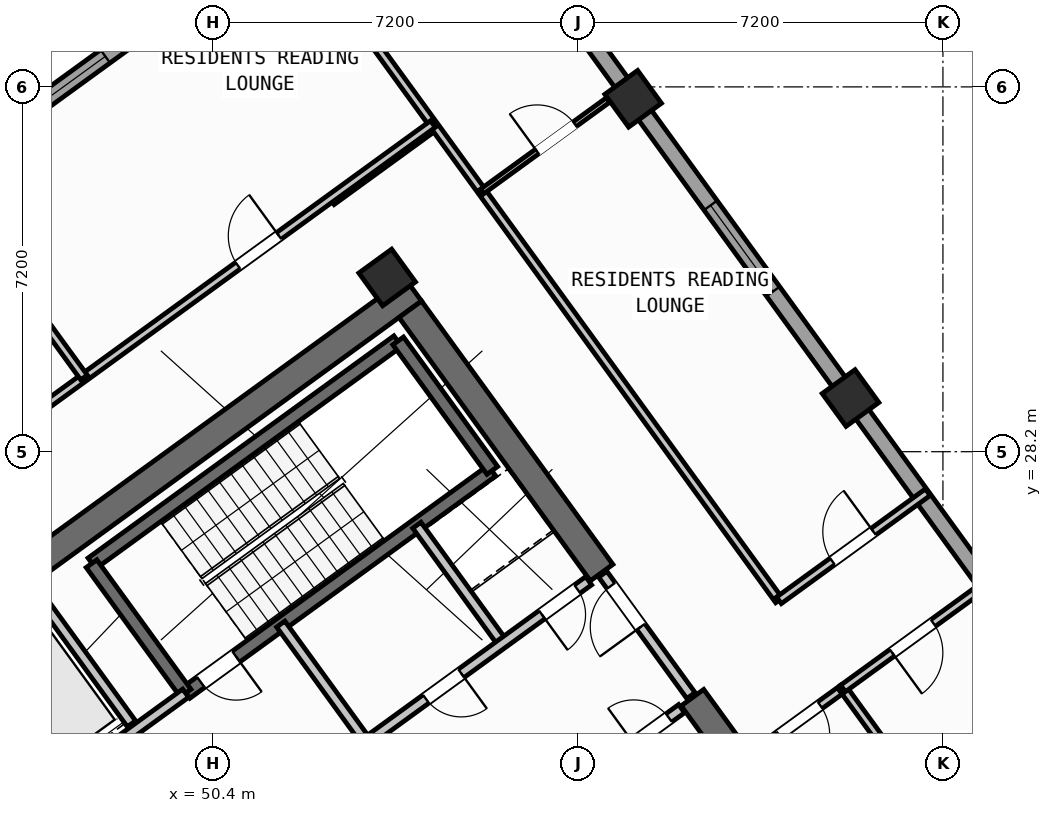
"""IFC4 building model, lengths in metres.
Left out: names, types, materials, properties, quantities, classifications, styles, units other than length and angle.
Written with IfcOpenShell. Run it as: python <this file> out.ifc"""

import sys

from ifc_helpers import new_model, si_unit, direction, frame, frame_2d, origin, origin_2d, place, context, subcontext, project, spatial, rectangle, hollow_rectangle, extrude, source, transform, mapped, element, fill, save


model = new_model("IFC4")
c1 = context("Model", 3, precision=1e-05, world=origin(), true_north=direction((0.0, 1.0)))
c2 = subcontext(c1, "Body", "Model", "MODEL_VIEW")
j1 = project(units=[si_unit("LENGTHUNIT", "METRE"), si_unit("PLANEANGLEUNIT", "RADIAN")], contexts=[c1])
p1 = place(None, origin())
s1 = spatial("IfcSite", under=j1, at=p1, CompositionType="ELEMENT")
p2 = place(p1, origin())
s2 = spatial("IfcBuilding", under=s1, at=p2, CompositionType="ELEMENT")
p3 = place(p2, frame((0.0, 0.0, 199.5)))
s3 = spatial("IfcBuildingStorey", under=s2, at=p3, CompositionType="ELEMENT", Elevation=199.5)
p4 = place(p3, frame((44.365, 24.142, 0.0), z_axis=(0.0, 0.0, 1.0), x_axis=(0.809024304885, 0.587775190107, 0.0)))
e1 = element("IfcWall", 1, at=p4, inside=s3, PredefinedType="SHEAR", context=c2, shape_type="SweptSolid", body=[
    extrude(rectangle(XDim=12.34, YDim=0.55, at=frame_2d((6.17, 0.0))), origin(), (0.0, 0.0, 1.0), 4.25),
])
p5 = place(p3, frame((48.526, 18.884, 0.0), z_axis=(0.0, 0.0, 1.0), x_axis=(-0.587764933797, 0.809031756236, 0.0)))
e2 = element("IfcWall", 2, at=p5, inside=s3, PredefinedType="SHEAR", context=c2, shape_type="SweptSolid", body=[
    extrude(rectangle(XDim=6.425, YDim=0.55, at=frame_2d((3.212, 0.0))), origin(), (0.0, 0.0, 1.0), 4.25),
])
p6 = place(p3, frame((61.958, 20.454, 0.0), z_axis=(0.0, 0.0, 1.0), x_axis=(-0.587802113096, 0.809004744015, 0.0)))
e3 = element("IfcWall", 3, at=p6, inside=s3, PredefinedType="SHEAR", context=c2, shape_type="SweptSolid", body=[
    extrude(rectangle(XDim=3.575, YDim=0.55, at=frame_2d((1.788, 0.0))), origin(), (0.0, 0.0, 1.0), 4.25),
])
p7 = place(p3, frame((58.064, 25.813, 0.0), z_axis=(0.0, 0.0, 1.0), x_axis=(-0.587764933797, 0.809031756236, 0.0)))
e4 = element("IfcWall", 4, at=p7, inside=s3, PredefinedType="SHEAR", context=c2, shape_type="SweptSolid", body=[
    extrude(rectangle(XDim=6.425, YDim=0.55, at=frame_2d((3.212, 0.0))), origin(), (0.0, 0.0, 1.0), 4.25),
])
m1 = source(origin(), c2, "Body", "SweptSolid", [
    extrude(hollow_rectangle(XDim=0.8, YDim=0.8, WallThickness=0.032, at=origin_2d()), origin(), (0.0, 0.0, 1.0), 4.5),
])
for number, where, z_axis, x_axis in (
    (5, (53.832, 31.638, 0.0), (0.0, 0.0, 1.0), (0.809, 0.588, 0.0)),
    (6, (62.977, 29.259, 0.0), (0.0, 0.0, 1.0), (0.809, 0.588, 0.0)),
    (7, (58.686, 35.165, 0.0), (0.0, 0.0, 1.0), (0.809, 0.588, 0.0)),
):
    element("IfcColumn", number, at=place(p3, frame(where, z_axis=z_axis, x_axis=x_axis)), inside=s3, PredefinedType="COLUMN", context=c2, shape_type="MappedRepresentation", body=[
        mapped(m1, transform((0.0, 0.0, 0.0), scale=1.0)),
    ])
p8 = place(p3, frame((42.207, 31.597, 0.0), z_axis=(0.0, 0.0, 1.0), x_axis=(0.809020333377, 0.587780656523, 0.0)))
e8 = element("IfcWall", 8, at=p8, inside=s3, PredefinedType="STANDARD", context=c2, shape_type="SweptSolid", body=[
    extrude(rectangle(XDim=15.223, YDim=0.32, at=frame_2d((7.611, 0.0))), origin(), (0.0, 0.0, 1.0), 4.25),
])
p9 = place(p8, frame((12.82, 0.0, 0.0)))
e9 = element("IfcOpeningElement", 9, at=p9, cuts=e8, PredefinedType="OPENING", context=c2, shape_type="SweptSolid", body=[
    extrude(rectangle(XDim=1.05, YDim=2.15, at=frame_2d((0.525, 1.075))), frame((0.0, 0.17, 0.0), z_axis=(0.0, -1.0, 0.0), x_axis=(1.0, 0.0, 0.0)), (0.0, 0.0, 1.0), 0.34),
])
p10 = place(p8, frame((1.018, 0.0, 0.85)))
e10 = element("IfcOpeningElement", 10, at=p10, cuts=e8, PredefinedType="OPENING", context=c2, shape_type="SweptSolid", body=[
    extrude(rectangle(XDim=1.5, YDim=1.5, at=frame_2d((0.75, 0.75))), frame((0.0, 0.17, 0.0), z_axis=(0.0, -1.0, 0.0), x_axis=(1.0, 0.0, 0.0)), (0.0, 0.0, 1.0), 0.34),
])
p11 = place(p8, frame((5.394, 0.0, 0.8)))
e11 = element("IfcOpeningElement", 11, at=p11, cuts=e8, PredefinedType="OPENING", context=c2, shape_type="SweptSolid", body=[
    extrude(rectangle(XDim=2.1, YDim=1.55, at=frame_2d((1.05, 0.775))), frame((0.0, 0.17, 0.0), z_axis=(0.0, -1.0, 0.0), x_axis=(1.0, 0.0, 0.0)), (0.0, 0.0, 1.0), 0.34),
])
p12 = place(p3, frame((54.81, 40.5, 0.0), z_axis=(0.0, 0.0, 1.0), x_axis=(0.587783625747, -0.809018176127, 0.0)))
e12 = element("IfcWall", 12, at=p12, inside=s3, PredefinedType="STANDARD", context=c2, shape_type="SweptSolid", body=[
    extrude(rectangle(XDim=21.587, YDim=0.32, at=frame_2d((10.794, 0.0))), origin(), (0.0, 0.0, 1.0), 3.725),
])
p13 = place(p12, frame((2.018, 0.0, 0.65)))
e13 = element("IfcOpeningElement", 13, at=p13, cuts=e12, PredefinedType="OPENING", context=c2, shape_type="SweptSolid", body=[
    extrude(rectangle(XDim=2.8, YDim=2.1, at=frame_2d((1.4, 1.05))), frame((0.0, 0.17, 0.0), z_axis=(0.0, -1.0, 0.0), x_axis=(1.0, 0.0, 0.0)), (0.0, 0.0, 1.0), 0.34),
])
p14 = place(p12, frame((9.194, 0.0, 0.8)))
e14 = element("IfcOpeningElement", 14, at=p14, cuts=e12, PredefinedType="OPENING", context=c2, shape_type="SweptSolid", body=[
    extrude(rectangle(XDim=2.1, YDim=1.55, at=frame_2d((1.05, 0.775))), frame((0.0, 0.17, 0.0), z_axis=(0.0, -1.0, 0.0), x_axis=(1.0, 0.0, 0.0)), (0.0, 0.0, 1.0), 0.34),
])
p15 = place(p3, frame((67.454, 22.747, 0.0), z_axis=(0.0, 0.0, 1.0), x_axis=(-0.809021120468, -0.587779573171, 0.0)))
e15 = element("IfcWall", 15, at=p15, inside=s3, PredefinedType="STANDARD", context=c2, shape_type="SweptSolid", body=[
    extrude(rectangle(XDim=17.588, YDim=0.32, at=frame_2d((8.794, 0.0))), origin(), (0.0, 0.0, 1.0), 4.25),
])
p16 = place(p15, frame((1.624, 0.0, 0.0)))
e16 = element("IfcOpeningElement", 16, at=p16, cuts=e15, PredefinedType="OPENING", context=c2, shape_type="SweptSolid", body=[
    extrude(rectangle(XDim=1.05, YDim=2.15, at=frame_2d((0.525, 1.075))), frame((0.0, 0.17, 0.0), z_axis=(0.0, -1.0, 0.0), x_axis=(1.0, 0.0, 0.0)), (0.0, 0.0, 1.0), 0.34),
])
p17 = place(p15, frame((7.769, 0.0, 0.65)))
e17 = element("IfcOpeningElement", 17, at=p17, cuts=e15, PredefinedType="OPENING", context=c2, shape_type="SweptSolid", body=[
    extrude(rectangle(XDim=2.8, YDim=2.1, at=frame_2d((1.4, 1.05))), frame((0.0, 0.17, 0.0), z_axis=(0.0, -1.0, 0.0), x_axis=(1.0, 0.0, 0.0)), (0.0, 0.0, 1.0), 0.34),
])
p18 = place(p15, frame((13.019, 0.0, 0.65)))
e18 = element("IfcOpeningElement", 18, at=p18, cuts=e15, PredefinedType="OPENING", context=c2, shape_type="SweptSolid", body=[
    extrude(rectangle(XDim=2.8, YDim=2.1, at=frame_2d((1.4, 1.05))), frame((0.0, 0.17, 0.0), z_axis=(0.0, -1.0, 0.0), x_axis=(1.0, 0.0, 0.0)), (0.0, 0.0, 1.0), 0.34),
])
p19 = place(p3, frame((48.006, 25.996, 0.0), z_axis=(0.0, 0.0, 1.0), x_axis=(0.80901903764, 0.587782439969, 0.0)))
e19 = element("IfcWall", 19, at=p19, inside=s3, PredefinedType="SHEAR", context=c2, shape_type="SweptSolid", body=[
    extrude(rectangle(XDim=7.46, YDim=0.26, at=frame_2d((3.73, 0.0))), origin(), (0.0, 0.0, 1.0), 4.25),
])
p20 = place(p3, frame((49.863, 23.44, 0.0), z_axis=(0.0, 0.0, 1.0), x_axis=(0.809003474932, 0.587803859759, 0.0)))
e20 = element("IfcWall", 20, at=p20, inside=s3, PredefinedType="SHEAR", context=c2, shape_type="SweptSolid", body=[
    extrude(rectangle(XDim=7.46, YDim=0.26, at=frame_2d((3.73, 0.0))), origin(), (0.0, 0.0, 1.0), 4.25),
])
p21 = place(p20, frame((0.36, 0.0, 0.0)))
e21 = element("IfcOpeningElement", 21, at=p21, cuts=e20, PredefinedType="OPENING", context=c2, shape_type="SweptSolid", body=[
    extrude(rectangle(XDim=0.86, YDim=2.05, at=frame_2d((0.43, 1.025))), frame((0.0, 0.14, 0.0), z_axis=(0.0, -1.0, 0.0), x_axis=(1.0, 0.0, 0.0)), (0.0, 0.0, 1.0), 0.28),
])
p22 = place(p3, frame((49.855, 23.434, 0.0), z_axis=(0.0, 0.0, 1.0), x_axis=(-0.58776738483, 0.809029975545, 0.0)))
e22 = element("IfcWall", 22, at=p22, inside=s3, PredefinedType="SHEAR", context=c2, shape_type="SweptSolid", body=[
    extrude(rectangle(XDim=3.16, YDim=0.26, at=frame_2d((1.58, 0.0))), origin(), (0.0, 0.0, 1.0), 4.25),
])
p23 = place(p3, frame((55.906, 27.831, 0.0), z_axis=(0.0, 0.0, 1.0), x_axis=(-0.587804123638, 0.809003283204, 0.0)))
e23 = element("IfcWall", 23, at=p23, inside=s3, PredefinedType="SHEAR", context=c2, shape_type="SweptSolid", body=[
    extrude(rectangle(XDim=3.16, YDim=0.26, at=frame_2d((1.58, 0.0))), origin(), (0.0, 0.0, 1.0), 4.25),
])
p24 = place(p3, frame((47.065, 21.407, 0.0), z_axis=(0.0, 0.0, 1.0), x_axis=(0.809032984992, 0.587763242466, 0.0)))
e24 = element("IfcWall", 24, at=p24, inside=s3, PredefinedType="STANDARD", context=c2, shape_type="SweptSolid", body=[
    extrude(rectangle(XDim=3.448, YDim=0.2, at=frame_2d((1.724, 0.0))), origin(), (0.0, 0.0, 1.0), 4.24),
])
p25 = place(p24, frame((0.458, 0.0, 0.0)))
e25 = element("IfcOpeningElement", 25, at=p25, cuts=e24, PredefinedType="OPENING", context=c2, shape_type="SweptSolid", body=[
    extrude(rectangle(XDim=1.3, YDim=2.2, at=frame_2d((0.65, 1.1))), frame((0.0, 0.11, 0.0), z_axis=(0.0, -1.0, 0.0), x_axis=(1.0, 0.0, 0.0)), (0.0, 0.0, 1.0), 0.22),
])
p26 = place(p3, frame((56.553, 20.884, 0.0), z_axis=(0.0, 0.0, 1.0), x_axis=(0.809023564264, 0.58777620951, 0.0)))
e26 = element("IfcWall", 26, at=p26, inside=s3, PredefinedType="STANDARD", context=c2, shape_type="SweptSolid", body=[
    extrude(rectangle(XDim=3.818, YDim=0.2, at=frame_2d((1.909, 0.0))), origin(), (0.0, 0.0, 1.0), 4.24),
])
p27 = place(p26, frame((0.57, 0.0, 0.0)))
e27 = element("IfcOpeningElement", 27, at=p27, cuts=e26, PredefinedType="OPENING", context=c2, shape_type="SweptSolid", body=[
    extrude(rectangle(XDim=1.1, YDim=2.15, at=frame_2d((0.55, 1.075))), frame((0.0, 0.11, 0.0), z_axis=(0.0, -1.0, 0.0), x_axis=(1.0, 0.0, 0.0)), (0.0, 0.0, 1.0), 0.22),
])
p28 = place(p26, frame((2.65, 0.0, 0.0)))
e28 = element("IfcOpeningElement", 28, at=p28, cuts=e26, PredefinedType="OPENING", context=c2, shape_type="SweptSolid", body=[
    extrude(rectangle(XDim=0.86, YDim=2.05, at=frame_2d((0.43, 1.025))), frame((0.0, 0.11, 0.0), z_axis=(0.0, -1.0, 0.0), x_axis=(1.0, 0.0, 0.0)), (0.0, 0.0, 1.0), 0.22),
])
p29 = place(p3, frame((48.786, 22.83, 0.0), z_axis=(0.0, 0.0, 1.0), x_axis=(-0.587783856777, 0.809018008275, 0.0)))
e29 = element("IfcWall", 29, at=p29, inside=s3, PredefinedType="STANDARD", context=c2, shape_type="SweptSolid", body=[
    extrude(rectangle(XDim=2.92, YDim=0.2, at=frame_2d((1.46, 0.0))), origin(), (0.0, 0.0, 1.0), 4.24),
])
p30 = place(p3, frame((53.425, 22.468, 0.0), z_axis=(0.0, 0.0, 1.0), x_axis=(-0.5877230039, 0.809062216821, 0.0)))
e30 = element("IfcWall", 30, at=p30, inside=s3, PredefinedType="STANDARD", context=c2, shape_type="SweptSolid", body=[
    extrude(rectangle(XDim=2.88, YDim=0.2, at=frame_2d((1.44, 0.0))), origin(), (0.0, 0.0, 1.0), 4.24),
])
p31 = place(p3, frame((56.111, 24.419, 0.0), z_axis=(0.0, 0.0, 1.0), x_axis=(-0.58777848983, 0.809021907548, 0.0)))
e31 = element("IfcWall", 31, at=p31, inside=s3, PredefinedType="STANDARD", context=c2, shape_type="SweptSolid", body=[
    extrude(rectangle(XDim=2.88, YDim=0.2, at=frame_2d((1.44, 0.0))), origin(), (0.0, 0.0, 1.0), 4.24),
])
p32 = place(p3, frame((53.425, 22.468, 0.0), z_axis=(0.0, 0.0, 1.0), x_axis=(0.809024377198, 0.587775090574, 0.0)))
e32 = element("IfcWall", 32, at=p32, inside=s3, PredefinedType="STANDARD", context=c2, shape_type="SweptSolid", body=[
    extrude(rectangle(XDim=5.418, YDim=0.2, at=frame_2d((2.709, 0.0))), origin(), (0.0, 0.0, 1.0), 4.24),
])
p33 = place(p32, frame((4.28, 0.0, 0.0)))
e33 = element("IfcOpeningElement", 33, at=p33, cuts=e32, PredefinedType="OPENING", context=c2, shape_type="SweptSolid", body=[
    extrude(rectangle(XDim=0.86, YDim=2.05, at=frame_2d((0.43, 1.025))), frame((0.0, 0.11, 0.0), z_axis=(0.0, -1.0, 0.0), x_axis=(1.0, 0.0, 0.0)), (0.0, 0.0, 1.0), 0.22),
])
p34 = place(p32, frame((1.45, 0.0, 0.0)))
e34 = element("IfcOpeningElement", 34, at=p34, cuts=e32, PredefinedType="OPENING", context=c2, shape_type="SweptSolid", body=[
    extrude(rectangle(XDim=0.86, YDim=2.05, at=frame_2d((0.43, 1.025))), frame((0.0, 0.11, 0.0), z_axis=(0.0, -1.0, 0.0), x_axis=(1.0, 0.0, 0.0)), (0.0, 0.0, 1.0), 0.22),
])
p35 = place(p3, frame((59.827, 23.386, 0.0), z_axis=(0.0, 0.0, 1.0), x_axis=(-0.587803840107, 0.809003489211, 0.0)))
e35 = element("IfcWall", 35, at=p35, inside=s3, PredefinedType="STANDARD", context=c2, shape_type="SweptSolid", body=[
    extrude(rectangle(XDim=2.96, YDim=0.2, at=frame_2d((1.48, 0.0))), origin(), (0.0, 0.0, 1.0), 4.24),
])
p36 = place(p35, frame((1.68, 0.0, 0.0)))
e36 = element("IfcOpeningElement", 36, at=p36, cuts=e35, PredefinedType="OPENING", context=c2, shape_type="SweptSolid", body=[
    extrude(rectangle(XDim=1.0, YDim=2.1, at=frame_2d((0.5, 1.05))), frame((0.0, 0.11, 0.0), z_axis=(0.0, -1.0, 0.0), x_axis=(1.0, 0.0, 0.0)), (0.0, 0.0, 1.0), 0.22),
])
p37 = place(p3, frame((61.042, 22.229, 0.0), z_axis=(0.0, 0.0, 1.0), x_axis=(0.809075443949, 0.587704794942, 0.0)))
e37 = element("IfcWall", 37, at=p37, inside=s3, PredefinedType="PARTITIONING", context=c2, shape_type="SweptSolid", body=[
    extrude(rectangle(XDim=2.208, YDim=0.16, at=frame_2d((1.104, 0.0))), origin(), (0.0, 0.0, 1.0), 4.24),
])
p38 = place(p37, frame((0.648, 0.0, 0.0)))
e38 = element("IfcOpeningElement", 38, at=p38, cuts=e37, PredefinedType="OPENING", context=c2, shape_type="SweptSolid", body=[
    extrude(rectangle(XDim=1.0, YDim=2.1, at=frame_2d((0.5, 1.05))), frame((0.0, 0.09, 0.0), z_axis=(0.0, -1.0, 0.0), x_axis=(1.0, 0.0, 0.0)), (0.0, 0.0, 1.0), 0.18),
])
p39 = place(p3, frame((52.739, 33.143, 0.0), z_axis=(0.0, 0.0, 1.0), x_axis=(0.809000999347, 0.58780726693, 0.0)))
e39 = element("IfcWall", 39, at=p39, inside=s3, PredefinedType="PARTITIONING", context=c2, shape_type="SweptSolid", body=[
    extrude(rectangle(XDim=2.51, YDim=0.16, at=frame_2d((1.255, 0.0))), origin(), (0.0, 0.0, 1.0), 4.24),
])
p40 = place(p3, frame((64.709, 20.938, 0.0), z_axis=(0.0, 0.0, 1.0), x_axis=(-0.587772420479, 0.809026317077, 0.0)))
e40 = element("IfcWall", 40, at=p40, inside=s3, PredefinedType="PARTITIONING", context=c2, shape_type="SweptSolid", body=[
    extrude(rectangle(XDim=3.2, YDim=0.16, at=frame_2d((1.6, 0.0))), origin(), (0.0, 0.0, 1.0), 4.24),
])
p41 = place(p3, frame((61.564, 25.266, 0.0), z_axis=(0.0, 0.0, 1.0), x_axis=(-0.587784527444, 0.809017521007, 0.0)))
e41 = element("IfcWall", 41, at=p41, inside=s3, PredefinedType="PARTITIONING", context=c2, shape_type="SweptSolid", body=[
    extrude(rectangle(XDim=16.35, YDim=0.16, at=frame_2d((8.175, 0.0))), origin(), (0.0, 0.0, 1.0), 4.24),
])
p42 = place(p3, frame((62.828, 23.527, 0.0), z_axis=(0.0, 0.0, 1.0), x_axis=(0.809003564202, 0.587803736896, 0.0)))
e42 = element("IfcWall", 42, at=p42, inside=s3, PredefinedType="PARTITIONING", context=c2, shape_type="SweptSolid", body=[
    extrude(rectangle(XDim=3.63, YDim=0.16, at=frame_2d((1.815, 0.0))), origin(), (0.0, 0.0, 1.0), 4.24),
])
p43 = place(p42, frame((1.2, 0.0, 0.0)))
e43 = element("IfcOpeningElement", 43, at=p43, cuts=e42, PredefinedType="OPENING", context=c2, shape_type="SweptSolid", body=[
    extrude(rectangle(XDim=1.0, YDim=2.1, at=frame_2d((0.5, 1.05))), frame((0.0, 0.09, 0.0), z_axis=(0.0, -1.0, 0.0), x_axis=(1.0, 0.0, 0.0)), (0.0, 0.0, 1.0), 0.18),
])
p44 = place(p3, frame((61.564, 25.266, 0.0), z_axis=(0.0, 0.0, 1.0), x_axis=(0.809012309495, 0.587791700422, 0.0)))
e44 = element("IfcWall", 44, at=p44, inside=s3, PredefinedType="PARTITIONING", context=c2, shape_type="SweptSolid", body=[
    extrude(rectangle(XDim=3.63, YDim=0.16, at=frame_2d((1.815, 0.0))), origin(), (0.0, 0.0, 1.0), 4.24),
])
p45 = place(p44, frame((1.305, 0.0, 0.0)))
e45 = element("IfcOpeningElement", 45, at=p45, cuts=e44, PredefinedType="OPENING", context=c2, shape_type="SweptSolid", body=[
    extrude(rectangle(XDim=1.0, YDim=2.1, at=frame_2d((0.5, 1.05))), frame((0.0, 0.09, 0.0), z_axis=(0.0, -1.0, 0.0), x_axis=(1.0, 0.0, 0.0)), (0.0, 0.0, 1.0), 0.18),
])
p46 = place(p3, frame((55.703, 33.334, 0.0), z_axis=(0.0, 0.0, 1.0), x_axis=(0.809044670406, 0.587747157618, 0.0)))
e46 = element("IfcWall", 46, at=p46, inside=s3, PredefinedType="PARTITIONING", context=c2, shape_type="SweptSolid", body=[
    extrude(rectangle(XDim=3.078, YDim=0.11, at=frame_2d((1.539, 0.0))), origin(), (0.0, 0.0, 1.0), 3.725),
])
p47 = place(p46, frame((1.345, 0.0, 0.0)))
e47 = element("IfcOpeningElement", 47, at=p47, cuts=e46, PredefinedType="OPENING", context=c2, shape_type="SweptSolid", body=[
    extrude(rectangle(XDim=0.92, YDim=2.08, at=frame_2d((0.46, 1.04))), frame((0.0, 0.065, 0.0), z_axis=(0.0, -1.0, 0.0), x_axis=(1.0, 0.0, 0.0)), (0.0, 0.0, 1.0), 0.13),
])
p48 = place(p3, frame((42.866, 26.044, 0.0), z_axis=(0.0, 0.0, 1.0), x_axis=(0.809020254154, 0.587780765566, 0.0)))
e48 = element("IfcWall", 48, at=p48, inside=s3, PredefinedType="PARTITIONING", context=c2, shape_type="SweptSolid", body=[
    extrude(rectangle(XDim=14.67, YDim=0.16, at=frame_2d((7.335, 0.0))), origin(), (0.0, 0.0, 1.0), 4.24),
])
p49 = place(p48, frame((3.215, 0.0, 0.0)))
e49 = element("IfcOpeningElement", 49, at=p49, cuts=e48, PredefinedType="OPENING", context=c2, shape_type="SweptSolid", body=[
    extrude(rectangle(XDim=1.0, YDim=2.1, at=frame_2d((0.5, 1.05))), frame((0.0, 0.09, 0.0), z_axis=(0.0, -1.0, 0.0), x_axis=(1.0, 0.0, 0.0)), (0.0, 0.0, 1.0), 0.18),
])
p50 = place(p48, frame((9.915, 0.0, 0.0)))
e50 = element("IfcOpeningElement", 50, at=p50, cuts=e48, PredefinedType="OPENING", context=c2, shape_type="SweptSolid", body=[
    extrude(rectangle(XDim=1.0, YDim=2.1, at=frame_2d((0.5, 1.05))), frame((0.0, 0.09, 0.0), z_axis=(0.0, -1.0, 0.0), x_axis=(1.0, 0.0, 0.0)), (0.0, 0.0, 1.0), 0.18),
])
p51 = place(p3, frame((47.849, 29.665, 0.0), z_axis=(0.0, 0.0, 1.0), x_axis=(-0.587785532001, 0.809016791155, 0.0)))
e51 = element("IfcWall", 51, at=p51, inside=s3, PredefinedType="PARTITIONING", context=c2, shape_type="SweptSolid", body=[
    extrude(rectangle(XDim=4.85, YDim=0.16, at=frame_2d((2.425, 0.0))), origin(), (0.0, 0.0, 1.0), 4.24),
])
m2 = source(origin(), c2, "Body", "SweptSolid", [
    extrude(rectangle(XDim=2.1, YDim=1.55, at=frame_2d((1.05, 0.775))), frame((0.0, 0.03, 0.0), z_axis=(0.0, -1.0, 0.0), x_axis=(1.0, 0.0, 0.0)), (0.0, 0.0, 1.0), 0.06),
])
p52 = place(p11, origin())
e52 = element("IfcWindow", 52, at=p52, inside=s3, PartitioningType="SINGLE_PANEL", PredefinedType="WINDOW", context=c2, shape_type="MappedRepresentation", body=[
    mapped(m2, transform((0.0, 0.0, 0.0), scale=1.0)),
])
fill(e11, e52)
p53 = place(p14, origin())
e53 = element("IfcWindow", 53, at=p53, inside=s3, PartitioningType="SINGLE_PANEL", PredefinedType="WINDOW", context=c2, shape_type="MappedRepresentation", body=[
    mapped(m2, transform((0.0, 0.0, 0.0), scale=1.0)),
])
fill(e14, e53)
m3 = source(origin(), c2, "Body", "SweptSolid", [
    extrude(rectangle(XDim=0.86, YDim=2.05, at=frame_2d((0.43, 1.025))), frame((0.0, 0.025, 0.0), z_axis=(0.0, -1.0, 0.0), x_axis=(1.0, 0.0, 0.0)), (0.0, 0.0, 1.0), 0.05),
])
p54 = place(p21, frame((0.86, 0.0, 0.0), z_axis=(0.0, 0.0, 1.0), x_axis=(-1.0, 0.0, 0.0)))
e54 = element("IfcDoor", 54, at=p54, inside=s3, OperationType="SINGLE_SWING_LEFT", PredefinedType="DOOR", context=c2, shape_type="MappedRepresentation", body=[
    mapped(m3, transform((0.0, 0.0, 0.0), scale=1.0)),
])
fill(e21, e54)
p55 = place(p28, origin())
e55 = element("IfcDoor", 55, at=p55, inside=s3, OperationType="SINGLE_SWING_LEFT", PredefinedType="DOOR", context=c2, shape_type="MappedRepresentation", body=[
    mapped(m3, transform((0.0, 0.0, 0.0), scale=1.0)),
])
fill(e28, e55)
p56 = place(p33, frame((0.86, 0.0, 0.0), z_axis=(0.0, 0.0, 1.0), x_axis=(-1.0, 0.0, 0.0)))
e56 = element("IfcDoor", 56, at=p56, inside=s3, OperationType="SINGLE_SWING_RIGHT", PredefinedType="DOOR", context=c2, shape_type="MappedRepresentation", body=[
    mapped(m3, transform((0.0, 0.0, 0.0), scale=1.0)),
])
fill(e33, e56)
p57 = place(p34, frame((0.86, 0.0, 0.0), z_axis=(0.0, 0.0, 1.0), x_axis=(-1.0, 0.0, 0.0)))
e57 = element("IfcDoor", 57, at=p57, inside=s3, OperationType="SINGLE_SWING_LEFT", PredefinedType="DOOR", context=c2, shape_type="MappedRepresentation", body=[
    mapped(m3, transform((0.0, 0.0, 0.0), scale=1.0)),
])
fill(e34, e57)
m4 = source(origin(), c2, "Body", "SweptSolid", [
    extrude(rectangle(XDim=1.0, YDim=2.1, at=frame_2d((0.5, 1.05))), frame((0.0, 0.025, 0.0), z_axis=(0.0, -1.0, 0.0), x_axis=(1.0, 0.0, 0.0)), (0.0, 0.0, 1.0), 0.05),
])
p58 = place(p38, frame((1.0, 0.0, 0.0), z_axis=(0.0, 0.0, 1.0), x_axis=(-1.0, 0.0, 0.0)))
e58 = element("IfcDoor", 58, at=p58, inside=s3, OperationType="SINGLE_SWING_RIGHT", PredefinedType="DOOR", context=c2, shape_type="MappedRepresentation", body=[
    mapped(m4, transform((0.0, 0.0, 0.0), scale=1.0)),
])
fill(e38, e58)
p59 = place(p36, origin())
e59 = element("IfcDoor", 59, at=p59, inside=s3, OperationType="SINGLE_SWING_LEFT", PredefinedType="DOOR", context=c2, shape_type="MappedRepresentation", body=[
    mapped(m4, transform((0.0, 0.0, 0.0), scale=1.0)),
])
fill(e36, e59)
p60 = place(p45, origin())
e60 = element("IfcDoor", 60, at=p60, inside=s3, OperationType="SINGLE_SWING_RIGHT", PredefinedType="DOOR", context=c2, shape_type="MappedRepresentation", body=[
    mapped(m4, transform((0.0, 0.0, 0.0), scale=1.0)),
])
fill(e45, e60)
m5 = source(origin(), c2, "Body", "SweptSolid", [
    extrude(rectangle(XDim=0.92, YDim=2.08, at=frame_2d((0.46, 1.04))), frame((0.0, 0.025, 0.0), z_axis=(0.0, -1.0, 0.0), x_axis=(1.0, 0.0, 0.0)), (0.0, 0.0, 1.0), 0.05),
])
p61 = place(p47, origin())
e61 = element("IfcDoor", 61, at=p61, inside=s3, OperationType="SINGLE_SWING_LEFT", PredefinedType="DOOR", context=c2, shape_type="MappedRepresentation", body=[
    mapped(m5, transform((0.0, 0.0, 0.0), scale=1.0)),
])
fill(e47, e61)
p62 = place(p43, frame((1.0, 0.0, 0.0), z_axis=(0.0, 0.0, 1.0), x_axis=(-1.0, 0.0, 0.0)))
e62 = element("IfcDoor", 62, at=p62, inside=s3, OperationType="SINGLE_SWING_RIGHT", PredefinedType="DOOR", context=c2, shape_type="MappedRepresentation", body=[
    mapped(m4, transform((0.0, 0.0, 0.0), scale=1.0)),
])
fill(e43, e62)
p63 = place(p50, origin())
e63 = element("IfcDoor", 63, at=p63, inside=s3, OperationType="SINGLE_SWING_RIGHT", PredefinedType="DOOR", context=c2, shape_type="MappedRepresentation", body=[
    mapped(m4, transform((0.0, 0.0, 0.0), scale=1.0)),
])
fill(e50, e63)
save(model, sys.argv[1])
